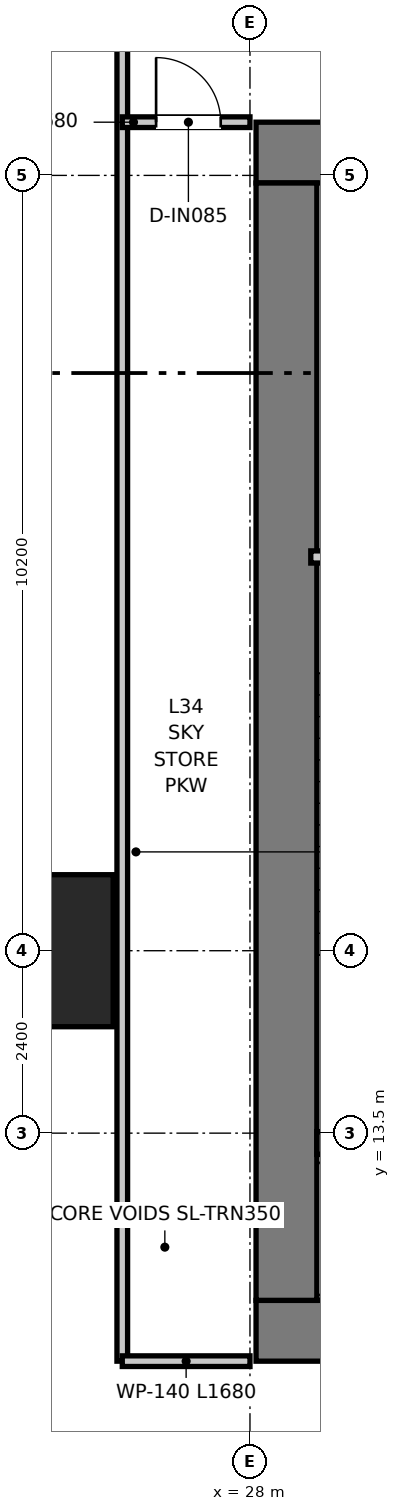
"""IFC4 building model, lengths in metres.
Left out: names, types, materials, properties, quantities, classifications, styles, units other than length and angle.
Written with IfcOpenShell. Run it as: python <this file> out.ifc"""

import sys

from ifc_helpers import new_model, si_unit, direction, frame, frame_2d, origin, origin_2d, place, context, subcontext, project, spatial, rectangle, extrude, source, transform, mapped, element, fill, save


model = new_model("IFC4")
c1 = context("Model", 3, precision=1e-05, world=origin(), true_north=direction((0.0, 1.0)))
c2 = subcontext(c1, "Body", "Model", "MODEL_VIEW")
j1 = project(units=[si_unit("LENGTHUNIT", "METRE"), si_unit("PLANEANGLEUNIT", "RADIAN")], contexts=[c1])
p1 = place(None, origin())
s1 = spatial("IfcSite", under=j1, at=p1, CompositionType="ELEMENT")
p2 = place(p1, origin())
s2 = spatial("IfcBuilding", under=s1, at=p2, CompositionType="ELEMENT")
p3 = place(p2, frame((0.0, 0.0, 141.4)))
s3 = spatial("IfcBuildingStorey", under=s2, at=p3, CompositionType="ELEMENT", Elevation=141.4)
p4 = place(p3, frame((28.08, 10.9, 0.0), z_axis=(0.0, 0.0, 1.0), x_axis=(1.0, 0.0, 0.0)))
e1 = element("IfcWall", 1, at=p4, inside=s3, PredefinedType="SHEAR", context=c2, shape_type="SweptSolid", body=[
    extrude(rectangle(XDim=15.84, YDim=0.8, at=frame_2d((7.92, 0.0))), origin(), (0.0, 0.0, 1.0), 4.8),
])
p5 = place(p3, frame((28.08, 26.4, 0.0), z_axis=(0.0, 0.0, 1.0), x_axis=(1.0, 0.0, 0.0)))
e2 = element("IfcWall", 2, at=p5, inside=s3, PredefinedType="SHEAR", context=c2, shape_type="SweptSolid", body=[
    extrude(rectangle(XDim=15.84, YDim=0.8, at=frame_2d((7.92, 0.0))), origin(), (0.0, 0.0, 1.0), 4.8),
])
p6 = place(p5, frame((7.22, 0.0, 0.0)))
e3 = element("IfcOpeningElement", 3, at=p6, cuts=e2, PredefinedType="OPENING", context=c2, shape_type="SweptSolid", body=[
    extrude(rectangle(XDim=1.4, YDim=2.2, at=frame_2d((0.7, 1.1))), frame((0.0, 0.41, 0.0), z_axis=(0.0, -1.0, 0.0), x_axis=(1.0, 0.0, 0.0)), (0.0, 0.0, 1.0), 0.82),
])
p7 = place(p5, frame((1.775, 0.0, 0.0)))
e4 = element("IfcOpeningElement", 4, at=p7, cuts=e2, PredefinedType="OPENING", context=c2, shape_type="SweptSolid", body=[
    extrude(rectangle(XDim=1.05, YDim=2.1, at=frame_2d((0.525, 1.05))), frame((0.0, 0.41, 0.0), z_axis=(0.0, -1.0, 0.0), x_axis=(1.0, 0.0, 0.0)), (0.0, 0.0, 1.0), 0.82),
])
p8 = place(p5, frame((13.015, 0.0, 0.0)))
e5 = element("IfcOpeningElement", 5, at=p8, cuts=e2, PredefinedType="OPENING", context=c2, shape_type="SweptSolid", body=[
    extrude(rectangle(XDim=1.05, YDim=2.1, at=frame_2d((0.525, 1.05))), frame((0.0, 0.41, 0.0), z_axis=(0.0, -1.0, 0.0), x_axis=(1.0, 0.0, 0.0)), (0.0, 0.0, 1.0), 0.82),
])
p9 = place(p3, frame((28.48, 11.3, 0.0), z_axis=(0.0, 0.0, 1.0), x_axis=(0.0, 1.0, 0.0)))
e6 = element("IfcWall", 6, at=p9, inside=s3, PredefinedType="SHEAR", context=c2, shape_type="SweptSolid", body=[
    extrude(rectangle(XDim=14.7, YDim=0.8, at=frame_2d((7.35, 0.0))), origin(), (0.0, 0.0, 1.0), 4.8),
])
p10 = place(p3, frame((28.88, 13.37, 0.0), z_axis=(0.0, 0.0, 1.0), x_axis=(1.0, 0.0, 0.0)))
e7 = element("IfcWall", 7, at=p10, inside=s3, PredefinedType="SHEAR", context=c2, shape_type="SweptSolid", body=[
    extrude(rectangle(XDim=3.1, YDim=0.3, at=frame_2d((1.55, 0.0))), origin(), (0.0, 0.0, 1.0), 4.8),
])
m1 = source(origin(), c2, "Body", "SweptSolid", [
    extrude(rectangle(XDim=2.0, YDim=2.0, at=origin_2d()), origin(), (0.0, 0.0, 1.0), 4.8),
])
p11 = place(p3, frame((25.2, 15.9, 0.0), z_axis=(0.0, 0.0, 1.0), x_axis=(1.0, 0.0, 0.0)))
e8 = element("IfcColumn", 8, at=p11, inside=s3, PredefinedType="USERDEFINED", context=c2, shape_type="MappedRepresentation", body=[
    mapped(m1, transform((0.0, 0.0, 0.0), x_axis=(1.0, 0.0, 0.0), y_axis=(0.0, 1.0, 0.0), z_axis=(0.0, 0.0, 1.0), scale=1.0)),
])
p12 = place(p3, frame((28.8, 21.08, 0.0), z_axis=(0.0, 0.0, 1.0), x_axis=(1.0, 0.0, 0.0)))
e9 = element("IfcWall", 9, at=p12, inside=s3, PredefinedType="PARTITIONING", context=c2, shape_type="SweptSolid", body=[
    extrude(rectangle(XDim=3.16, YDim=0.16, at=frame_2d((1.58, 0.0))), origin(), (0.0, 0.0, 1.0), 4.52),
])
p13 = place(p12, frame((1.055, 0.0, 0.0)))
e10 = element("IfcOpeningElement", 10, at=p13, cuts=e9, PredefinedType="OPENING", context=c2, shape_type="SweptSolid", body=[
    extrude(rectangle(XDim=1.05, YDim=2.1, at=frame_2d((0.525, 1.05))), frame((0.0, 0.09, 0.0), z_axis=(0.0, -1.0, 0.0), x_axis=(1.0, 0.0, 0.0)), (0.0, 0.0, 1.0), 0.18),
])
p14 = place(p3, frame((26.32, 10.5, 0.0), z_axis=(0.0, 0.0, 1.0), x_axis=(0.0, 1.0, 0.0)))
e11 = element("IfcWall", 11, at=p14, inside=s3, PredefinedType="PARTITIONING", context=c2, shape_type="SweptSolid", body=[
    extrude(rectangle(XDim=42.135, YDim=0.14, at=frame_2d((21.067, 0.0))), origin(), (0.0, 0.0, 1.0), 3.82),
])
p15 = place(p14, frame((20.45, 0.0, 0.0)))
e12 = element("IfcOpeningElement", 12, at=p15, cuts=e11, PredefinedType="OPENING", context=c2, shape_type="SweptSolid", body=[
    extrude(rectangle(XDim=1.1, YDim=2.15, at=frame_2d((0.55, 1.075))), frame((0.0, 0.08, 0.0), z_axis=(0.0, -1.0, 0.0), x_axis=(1.0, 0.0, 0.0)), (0.0, 0.0, 1.0), 0.16),
])
p16 = place(p3, frame((26.32, 26.8, 0.0), z_axis=(0.0, 0.0, 1.0), x_axis=(1.0, 0.0, 0.0)))
e13 = element("IfcWall", 13, at=p16, inside=s3, PredefinedType="PARTITIONING", context=c2, shape_type="SweptSolid", body=[
    extrude(rectangle(XDim=1.68, YDim=0.14, at=frame_2d((0.84, 0.0))), origin(), (0.0, 0.0, 1.0), 3.93),
])
p17 = place(p16, frame((0.445, 0.0, 0.0)))
e14 = element("IfcOpeningElement", 14, at=p17, cuts=e13, PredefinedType="OPENING", context=c2, shape_type="SweptSolid", body=[
    extrude(rectangle(XDim=0.85, YDim=2.1, at=frame_2d((0.425, 1.05))), frame((0.0, 0.08, 0.0), z_axis=(0.0, -1.0, 0.0), x_axis=(1.0, 0.0, 0.0)), (0.0, 0.0, 1.0), 0.16),
])
p18 = place(p3, frame((26.32, 10.5, 0.0), z_axis=(0.0, 0.0, 1.0), x_axis=(1.0, 0.0, 0.0)))
e15 = element("IfcWall", 15, at=p18, inside=s3, PredefinedType="PARTITIONING", context=c2, shape_type="SweptSolid", body=[
    extrude(rectangle(XDim=1.68, YDim=0.14, at=frame_2d((0.84, 0.0))), origin(), (0.0, 0.0, 1.0), 4.52),
])
p19 = place(p17, origin())
e16 = element("IfcDoor", 16, at=p19, inside=s3, OperationType="SINGLE_SWING_LEFT", PredefinedType="DOOR", context=c2, shape_type="SweptSolid", body=[
    extrude(rectangle(XDim=0.85, YDim=2.1, at=frame_2d((0.425, 1.05))), frame((0.0, 0.025, 0.0), z_axis=(0.0, -1.0, 0.0), x_axis=(1.0, 0.0, 0.0)), (0.0, 0.0, 1.0), 0.05),
])
fill(e14, e16)
save(model, sys.argv[1])
